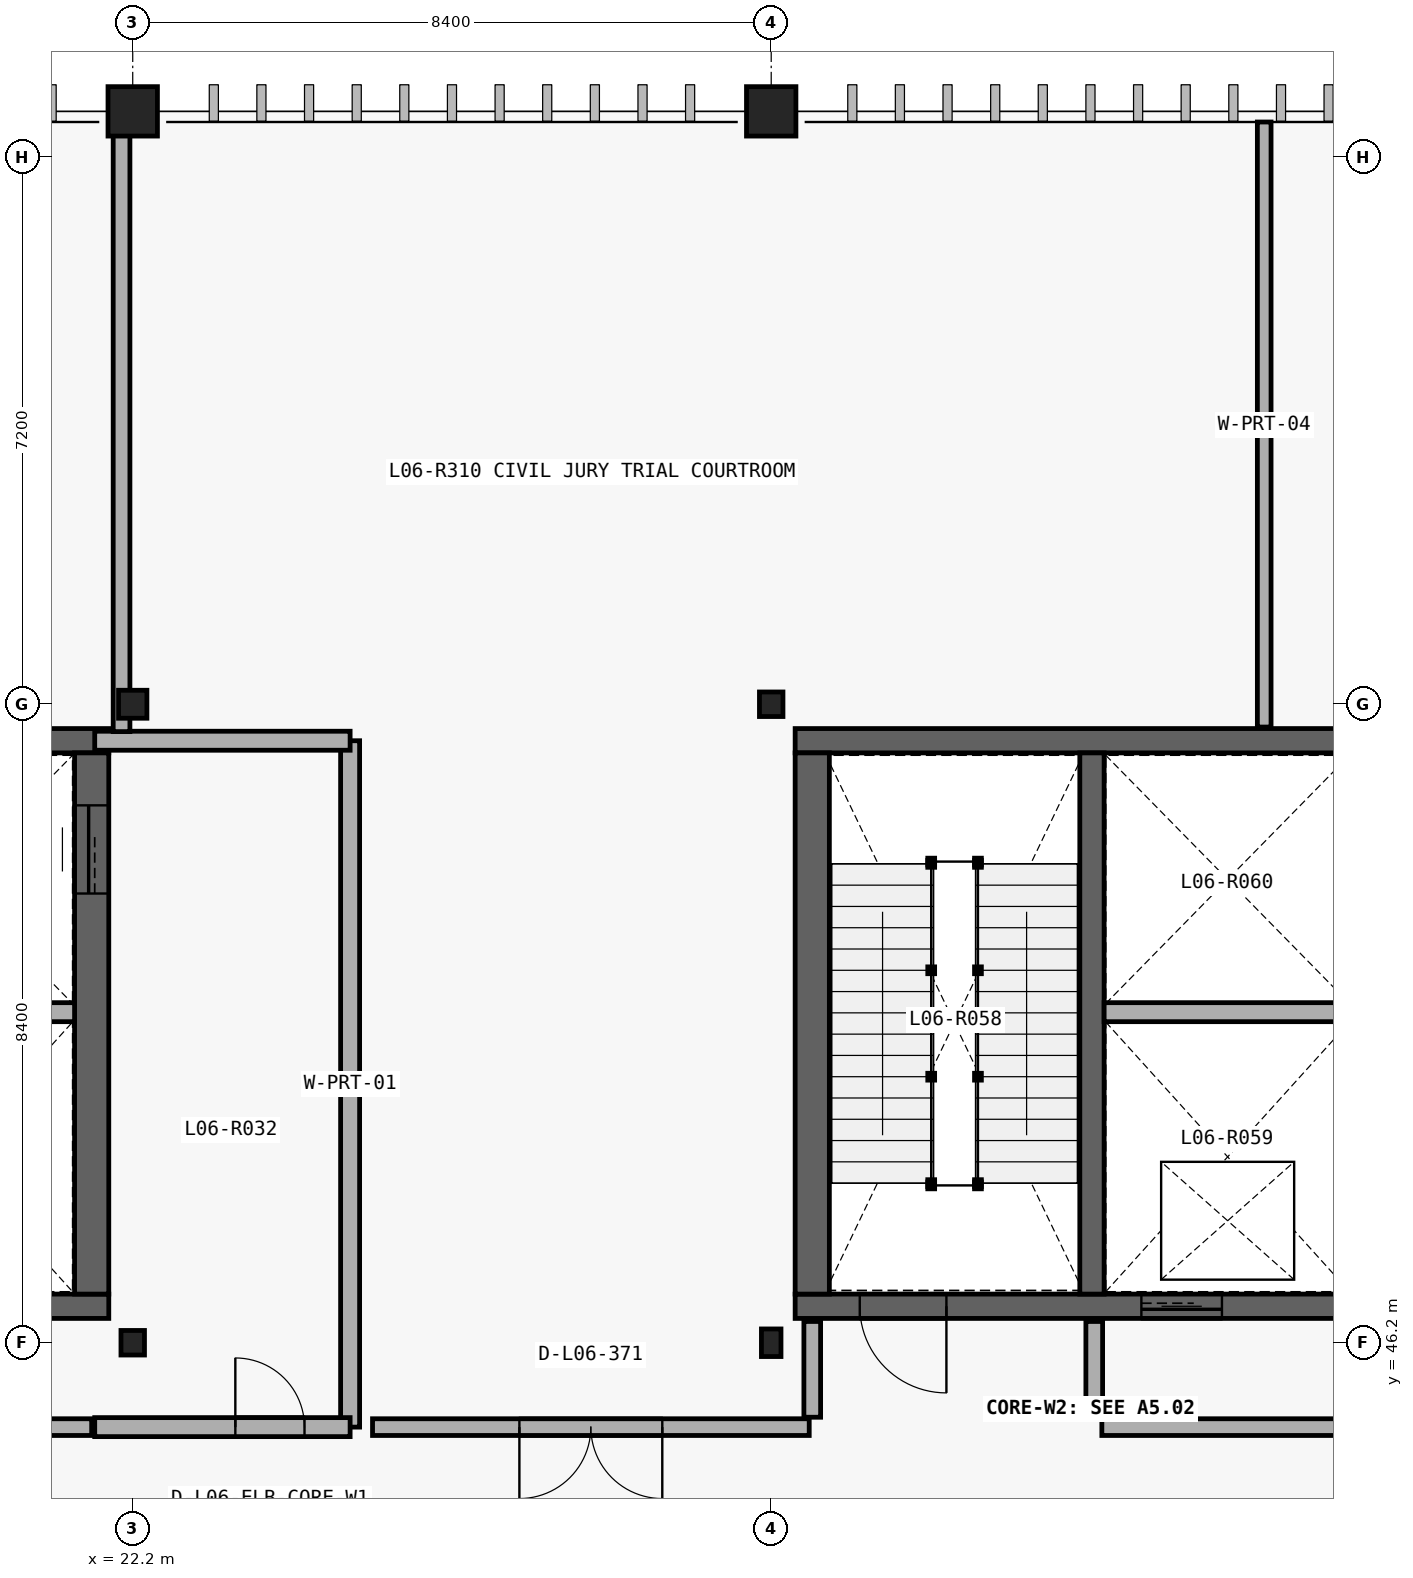
"""IFC4 building model, lengths in metres.
Left out: names, types, materials, properties, quantities, classifications, styles, units other than length and angle.
Written with IfcOpenShell. Run it as: python <this file> out.ifc"""

import sys

from ifc_helpers import new_model, si_unit, direction, frame, frame_2d, origin_with_axes, origin_2d_with_axis, place, context, subcontext, project, spatial, rectangle, circle, i_section, extrude, element, fill, save


model = new_model("IFC4")
c1 = context("Model", 3, precision=1e-05, world=origin_with_axes(), true_north=direction((0.0, 1.0)))
c2 = subcontext(c1, "Body", "Model", "MODEL_VIEW")
j1 = project(units=[si_unit("LENGTHUNIT", "METRE"), si_unit("PLANEANGLEUNIT", "RADIAN")], contexts=[c1])
p1 = place(None, origin_with_axes())
s1 = spatial("IfcSite", under=j1, at=p1, CompositionType="ELEMENT")
p2 = place(p1, origin_with_axes())
s2 = spatial("IfcBuilding", under=s1, at=p2, CompositionType="ELEMENT")
p3 = place(p2, frame((0.0, 0.0, 29.7), z_axis=(0.0, 0.0, 1.0), x_axis=(1.0, 0.0, 0.0)))
s3 = spatial("IfcBuildingStorey", under=s2, at=p3, CompositionType="ELEMENT", Elevation=29.7)
p4 = place(None, frame((14.115, 46.68, 29.7), z_axis=(0.0, 0.0, 1.0), x_axis=(1.0, 0.0, 0.0)))
e1 = element("IfcWall", 1, at=p4, inside=s3, PredefinedType="SHEAR", context=c2, shape_type="SweptSolid", body=[
    extrude(rectangle(XDim=7.77, YDim=0.32, at=frame_2d((3.885, 0.0), x_axis=(1.0, 0.0))), origin_with_axes(), (0.0, 0.0, 1.0), 4.8),
])
p5 = place(None, frame((15.535, 46.68, 29.7), z_axis=(0.0, 0.0, 1.0), x_axis=(1.0, 0.0, 0.0)))
e2 = element("IfcOpeningElement", 2, at=p5, cuts=e1, PredefinedType="OPENING", context=c2, shape_type="SweptSolid", body=[
    extrude(rectangle(XDim=1.14, YDim=2.18, at=frame_2d((0.0, 1.09), x_axis=(1.0, 0.0))), frame((0.0, 0.17, 0.0), z_axis=(0.0, -1.0, 0.0), x_axis=(1.0, 0.0, 0.0)), (0.0, 0.0, 1.0), 0.34),
])
p6 = place(None, frame((19.25, 46.68, 29.7), z_axis=(0.0, 0.0, 1.0), x_axis=(1.0, 0.0, 0.0)))
e3 = element("IfcOpeningElement", 3, at=p6, cuts=e1, PredefinedType="OPENING", context=c2, shape_type="SweptSolid", body=[
    extrude(rectangle(XDim=1.16, YDim=2.2, at=frame_2d((0.0, 1.1), x_axis=(1.0, 0.0))), frame((0.0, 0.17, 0.0), z_axis=(0.0, -1.0, 0.0), x_axis=(1.0, 0.0, 0.0)), (0.0, 0.0, 1.0), 0.34),
])
p7 = place(None, frame((21.885, 54.12, 29.7), z_axis=(0.0, 0.0, 1.0), x_axis=(-1.0, 0.0, 0.0)))
e4 = element("IfcWall", 4, at=p7, inside=s3, PredefinedType="SHEAR", context=c2, shape_type="SweptSolid", body=[
    extrude(rectangle(XDim=7.77, YDim=0.32, at=frame_2d((3.885, 0.0), x_axis=(1.0, 0.0))), origin_with_axes(), (0.0, 0.0, 1.0), 4.8),
])
p8 = place(None, frame((21.66, 46.84, 29.7), z_axis=(0.0, 0.0, 1.0), x_axis=(0.0, 1.0, 0.0)))
e5 = element("IfcWall", 5, at=p8, inside=s3, PredefinedType="SHEAR", context=c2, shape_type="SweptSolid", body=[
    extrude(rectangle(XDim=7.12, YDim=0.45, at=frame_2d((3.56, 0.0), x_axis=(1.0, 0.0))), origin_with_axes(), (0.0, 0.0, 1.0), 4.8),
])
p9 = place(None, frame((21.66, 52.69, 29.7), z_axis=(0.0, 0.0, 1.0), x_axis=(0.0, 1.0, 0.0)))
e6 = element("IfcOpeningElement", 6, at=p9, cuts=e5, PredefinedType="OPENING", context=c2, shape_type="SweptSolid", body=[
    extrude(rectangle(XDim=1.16, YDim=2.2, at=frame_2d((0.0, 1.1), x_axis=(1.0, 0.0))), frame((0.0, 0.235, 0.0), z_axis=(0.0, -1.0, 0.0), x_axis=(1.0, 0.0, 0.0)), (0.0, 0.0, 1.0), 0.47),
])
p10 = place(None, frame((18.18, 50.549, 29.7), z_axis=(0.0, 0.0, 1.0), x_axis=(1.0, 0.0, 0.0)))
e7 = element("IfcWall", 7, at=p10, inside=s3, PredefinedType="PARTITIONING", context=c2, shape_type="SweptSolid", body=[
    extrude(rectangle(XDim=3.255, YDim=0.25, at=frame_2d((1.627, 0.0), x_axis=(1.0, 0.0))), origin_with_axes(), (0.0, 0.0, 1.0), 4.48),
])
p11 = place(None, frame((25.06, 45.09, 29.7), z_axis=(0.0, 0.0, 1.0), x_axis=(0.0, 1.0, 0.0)))
e8 = element("IfcWall", 8, at=p11, inside=s3, PredefinedType="PARTITIONING", context=c2, shape_type="SweptSolid", body=[
    extrude(rectangle(XDim=9.03, YDim=0.25, at=frame_2d((4.515, 0.0), x_axis=(1.0, 0.0))), origin_with_axes(), (0.0, 0.0, 1.0), 4.48),
])
p12 = place(None, frame((21.7, 54.12, 29.7), z_axis=(0.0, 0.0, 1.0), x_axis=(1.0, 0.0, 0.0)))
e9 = element("IfcWall", 9, at=p12, inside=s3, PredefinedType="PARTITIONING", context=c2, shape_type="SweptSolid", body=[
    extrude(rectangle(XDim=3.36, YDim=0.25, at=frame_2d((1.68, 0.0), x_axis=(1.0, 0.0))), origin_with_axes(), (0.0, 0.0, 1.0), 4.48),
])
p13 = place(None, frame((21.7, 45.09, 29.7), z_axis=(0.0, 0.0, 1.0), x_axis=(1.0, 0.0, 0.0)))
e10 = element("IfcWall", 10, at=p13, inside=s3, PredefinedType="PARTITIONING", context=c2, shape_type="SweptSolid", body=[
    extrude(rectangle(XDim=3.36, YDim=0.25, at=frame_2d((1.68, 0.0), x_axis=(1.0, 0.0))), origin_with_axes(), (0.0, 0.0, 1.0), 4.48),
])
p14 = place(None, frame((24.005, 45.09, 29.7), z_axis=(0.0, 0.0, 1.0), x_axis=(1.0, 0.0, 0.0)))
e11 = element("IfcOpeningElement", 11, at=p14, cuts=e10, PredefinedType="OPENING", context=c2, shape_type="SweptSolid", body=[
    extrude(rectangle(XDim=0.91, YDim=2.12, at=frame_2d((0.0, 1.06), x_axis=(1.0, 0.0))), frame((0.0, 0.135, 0.0), z_axis=(0.0, -1.0, 0.0), x_axis=(1.0, 0.0, 0.0)), (0.0, 0.0, 1.0), 0.27),
])
p15 = place(None, frame((30.915, 46.68, 29.7), z_axis=(0.0, 0.0, 1.0), x_axis=(1.0, 0.0, 0.0)))
e12 = element("IfcWall", 12, at=p15, inside=s3, PredefinedType="SHEAR", context=c2, shape_type="SweptSolid", body=[
    extrude(rectangle(XDim=7.77, YDim=0.32, at=frame_2d((3.885, 0.0), x_axis=(1.0, 0.0))), origin_with_axes(), (0.0, 0.0, 1.0), 4.8),
])
p16 = place(None, frame((32.335, 46.68, 29.7), z_axis=(0.0, 0.0, 1.0), x_axis=(1.0, 0.0, 0.0)))
e13 = element("IfcOpeningElement", 13, at=p16, cuts=e12, PredefinedType="OPENING", context=c2, shape_type="SweptSolid", body=[
    extrude(rectangle(XDim=1.14, YDim=2.18, at=frame_2d((0.0, 1.09), x_axis=(1.0, 0.0))), frame((0.0, 0.17, 0.0), z_axis=(0.0, -1.0, 0.0), x_axis=(1.0, 0.0, 0.0)), (0.0, 0.0, 1.0), 0.34),
])
p17 = place(None, frame((36.0, 46.68, 29.7), z_axis=(0.0, 0.0, 1.0), x_axis=(1.0, 0.0, 0.0)))
e14 = element("IfcOpeningElement", 14, at=p17, cuts=e12, PredefinedType="OPENING", context=c2, shape_type="SweptSolid", body=[
    extrude(rectangle(XDim=1.06, YDim=2.16, at=frame_2d((0.0, 1.08), x_axis=(1.0, 0.0))), frame((0.0, 0.17, 0.0), z_axis=(0.0, -1.0, 0.0), x_axis=(1.0, 0.0, 0.0)), (0.0, 0.0, 1.0), 0.34),
])
p18 = place(None, frame((38.685, 54.12, 29.7), z_axis=(0.0, 0.0, 1.0), x_axis=(-1.0, 0.0, 0.0)))
e15 = element("IfcWall", 15, at=p18, inside=s3, PredefinedType="SHEAR", context=c2, shape_type="SweptSolid", body=[
    extrude(rectangle(XDim=7.77, YDim=0.32, at=frame_2d((3.885, 0.0), x_axis=(1.0, 0.0))), origin_with_axes(), (0.0, 0.0, 1.0), 4.8),
])
p19 = place(None, frame((31.14, 53.96, 29.7), z_axis=(0.0, 0.0, 1.0), x_axis=(0.0, -1.0, 0.0)))
e16 = element("IfcWall", 16, at=p19, inside=s3, PredefinedType="SHEAR", context=c2, shape_type="SweptSolid", body=[
    extrude(rectangle(XDim=7.12, YDim=0.45, at=frame_2d((3.56, 0.0), x_axis=(1.0, 0.0))), origin_with_axes(), (0.0, 0.0, 1.0), 4.8),
])
p20 = place(None, frame((34.82, 46.84, 29.7), z_axis=(0.0, 0.0, 1.0), x_axis=(0.0, 1.0, 0.0)))
e17 = element("IfcWall", 17, at=p20, inside=s3, PredefinedType="SHEAR", context=c2, shape_type="SweptSolid", body=[
    extrude(rectangle(XDim=7.12, YDim=0.32, at=frame_2d((3.56, 0.0), x_axis=(1.0, 0.0))), origin_with_axes(), (0.0, 0.0, 1.0), 4.8),
])
p21 = place(None, frame((34.98, 50.549, 29.7), z_axis=(0.0, 0.0, 1.0), x_axis=(1.0, 0.0, 0.0)))
e18 = element("IfcWall", 18, at=p21, inside=s3, PredefinedType="PARTITIONING", context=c2, shape_type="SweptSolid", body=[
    extrude(rectangle(XDim=3.255, YDim=0.25, at=frame_2d((1.627, 0.0), x_axis=(1.0, 0.0))), origin_with_axes(), (0.0, 0.0, 1.0), 4.48),
])
for number, where, z_axis, x_axis in (
    (19, (31.14, 45.22, 29.7), (0.0, 0.0, 1.0), (0.0, 1.0, 0.0)),
    (20, (34.85, 45.22, 29.7), (0.0, 0.0, 1.0), (0.0, 1.0, 0.0)),
):
    element("IfcWall", number, at=place(None, frame(where, z_axis=z_axis, x_axis=x_axis)), inside=s3, PredefinedType="PARTITIONING", context=c2, shape_type="SweptSolid", body=[
        extrude(rectangle(XDim=1.26, YDim=0.22, at=frame_2d((0.63, 0.0), x_axis=(1.0, 0.0))), origin_with_axes(), (0.0, 0.0, 1.0), 4.48),
    ])
p22 = place(None, frame((18.15, 45.09, 29.7), z_axis=(0.0, 0.0, 1.0), x_axis=(1.0, 0.0, 0.0)))
e21 = element("IfcWall", 21, at=p22, inside=s3, PredefinedType="PARTITIONING", context=c2, shape_type="SweptSolid", body=[
    extrude(rectangle(XDim=3.51, YDim=0.22, at=frame_2d((1.755, 0.0), x_axis=(1.0, 0.0))), origin_with_axes(), (0.0, 0.0, 1.0), 4.48),
])
p23 = place(None, frame((25.355, 45.09, 29.7), z_axis=(0.0, 0.0, 1.0), x_axis=(1.0, 0.0, 0.0)))
e22 = element("IfcWall", 22, at=p23, inside=s3, PredefinedType="PARTITIONING", context=c2, shape_type="SweptSolid", body=[
    extrude(rectangle(XDim=5.745, YDim=0.22, at=frame_2d((2.873, 0.0), x_axis=(1.0, 0.0))), origin_with_axes(), (0.0, 0.0, 1.0), 4.48),
])
p24 = place(None, frame((28.227, 45.09, 29.7), z_axis=(0.0, 0.0, 1.0), x_axis=(1.0, 0.0, 0.0)))
e23 = element("IfcOpeningElement", 23, at=p24, cuts=e22, PredefinedType="OPENING", context=c2, shape_type="SweptSolid", body=[
    extrude(rectangle(XDim=1.88, YDim=2.56, at=frame_2d((0.0, 1.28), x_axis=(1.0, 0.0))), frame((0.0, 0.12, 0.0), z_axis=(0.0, -1.0, 0.0), x_axis=(1.0, 0.0, 0.0)), (0.0, 0.0, 1.0), 0.24),
])
p25 = place(None, frame((34.95, 45.09, 29.7), z_axis=(0.0, 0.0, 1.0), x_axis=(1.0, 0.0, 0.0)))
e24 = element("IfcWall", 24, at=p25, inside=s3, PredefinedType="PARTITIONING", context=c2, shape_type="SweptSolid", body=[
    extrude(rectangle(XDim=11.71, YDim=0.22, at=frame_2d((5.855, 0.0), x_axis=(1.0, 0.0))), origin_with_axes(), (0.0, 0.0, 1.0), 4.48),
])
p26 = place(None, frame((41.711, 45.09, 29.7), z_axis=(0.0, 0.0, 1.0), x_axis=(1.0, 0.0, 0.0)))
e25 = element("IfcOpeningElement", 25, at=p26, cuts=e24, PredefinedType="OPENING", context=c2, shape_type="SweptSolid", body=[
    extrude(rectangle(XDim=1.6, YDim=2.32, at=frame_2d((0.0, 1.16), x_axis=(1.0, 0.0))), frame((0.0, 0.12, 0.0), z_axis=(0.0, -1.0, 0.0), x_axis=(1.0, 0.0, 0.0)), (0.0, 0.0, 1.0), 0.24),
])
p27 = place(None, frame((22.053, 54.24, 29.7), z_axis=(0.0, 0.0, 1.0), x_axis=(0.0, 1.0, 0.0)))
e26 = element("IfcWall", 26, at=p27, inside=s3, PredefinedType="PARTITIONING", context=c2, shape_type="SweptSolid", body=[
    extrude(rectangle(XDim=8.02, YDim=0.22, at=frame_2d((4.01, 0.0), x_axis=(1.0, 0.0))), origin_with_axes(), (0.0, 0.0, 1.0), 3.858),
])
p28 = place(None, frame((37.086, 54.3, 29.7), z_axis=(0.0, 0.0, 1.0), x_axis=(0.0, 1.0, 0.0)))
e27 = element("IfcWall", 27, at=p28, inside=s3, PredefinedType="PARTITIONING", context=c2, shape_type="SweptSolid", body=[
    extrude(rectangle(XDim=7.96, YDim=0.18, at=frame_2d((3.98, 0.0), x_axis=(1.0, 0.0))), origin_with_axes(), (0.0, 0.0, 1.0), 4.48),
])
p29 = place(None, frame((22.2, 46.2, 29.7), z_axis=(0.0, 0.0, 1.0), x_axis=(1.0, 0.0, 0.0)))
e28 = element("IfcColumn", 28, at=p29, inside=s3, PredefinedType="COLUMN", context=c2, shape_type="SweptSolid", body=[
    extrude(i_section(OverallWidth=0.309, OverallDepth=0.323, WebThickness=0.014, FlangeThickness=0.023, at=origin_2d_with_axis()), origin_with_axes(), (0.0, 0.0, 1.0), 4.8),
])
p30 = place(None, frame((22.2, 54.6, 29.7), z_axis=(0.0, 0.0, 1.0), x_axis=(1.0, 0.0, 0.0)))
e29 = element("IfcColumn", 29, at=p30, inside=s3, PredefinedType="COLUMN", context=c2, shape_type="SweptSolid", body=[
    extrude(i_section(OverallWidth=0.373, OverallDepth=0.368, WebThickness=0.015, FlangeThickness=0.024, at=origin_2d_with_axis()), origin_with_axes(), (0.0, 0.0, 1.0), 4.8),
])
p31 = place(None, frame((22.2, 62.4, 29.7), z_axis=(0.0, 0.0, 1.0), x_axis=(1.0, 0.0, 0.0)))
e30 = element("IfcColumn", 30, at=p31, inside=s3, PredefinedType="COLUMN", context=c2, shape_type="SweptSolid", body=[
    extrude(circle(Radius=0.325, at=origin_2d_with_axis()), origin_with_axes(), (0.0, 0.0, 1.0), 4.8),
])
p32 = place(None, frame((30.6, 46.2, 29.7), z_axis=(0.0, 0.0, 1.0), x_axis=(1.0, 0.0, 0.0)))
e31 = element("IfcColumn", 31, at=p32, inside=s3, PredefinedType="COLUMN", context=c2, shape_type="SweptSolid", body=[
    extrude(i_section(OverallWidth=0.257, OverallDepth=0.363, WebThickness=0.013, FlangeThickness=0.022, at=origin_2d_with_axis()), origin_with_axes(), (0.0, 0.0, 1.0), 4.8),
])
p33 = place(None, frame((30.6, 54.6, 29.7), z_axis=(0.0, 0.0, 1.0), x_axis=(1.0, 0.0, 0.0)))
e32 = element("IfcColumn", 32, at=p33, inside=s3, PredefinedType="COLUMN", context=c2, shape_type="SweptSolid", body=[
    extrude(i_section(OverallWidth=0.309, OverallDepth=0.323, WebThickness=0.014, FlangeThickness=0.023, at=origin_2d_with_axis()), origin_with_axes(), (0.0, 0.0, 1.0), 4.8),
])
p34 = place(None, frame((30.6, 62.4, 29.7), z_axis=(0.0, 0.0, 1.0), x_axis=(1.0, 0.0, 0.0)))
e33 = element("IfcColumn", 33, at=p34, inside=s3, PredefinedType="COLUMN", context=c2, shape_type="SweptSolid", body=[
    extrude(circle(Radius=0.325, at=origin_2d_with_axis()), origin_with_axes(), (0.0, 0.0, 1.0), 4.8),
])
p35 = place(None, frame((21.66, 52.69, 29.7), z_axis=(0.0, 0.0, 1.0), x_axis=(0.0, 1.0, 0.0)))
e34 = element("IfcDoor", 34, at=p35, inside=s3, OperationType="SLIDING_TO_LEFT", PredefinedType="DOOR", context=c2, shape_type="SweptSolid", body=[
    extrude(rectangle(XDim=1.16, YDim=2.2, at=frame_2d((0.0, 1.1), x_axis=(1.0, 0.0))), frame((0.0, 0.04, 0.0), z_axis=(0.0, -1.0, 0.0), x_axis=(1.0, 0.0, 0.0)), (0.0, 0.0, 1.0), 0.08),
])
fill(e6, e34)
p36 = place(None, frame((24.005, 45.09, 29.7), z_axis=(0.0, 0.0, 1.0), x_axis=(1.0, 0.0, 0.0)))
e35 = element("IfcDoor", 35, at=p36, inside=s3, OperationType="SINGLE_SWING_LEFT", PredefinedType="DOOR", context=c2, shape_type="SweptSolid", body=[
    extrude(rectangle(XDim=0.91, YDim=2.12, at=frame_2d((0.0, 1.06), x_axis=(1.0, 0.0))), frame((0.0, 0.04, 0.0), z_axis=(0.0, -1.0, 0.0), x_axis=(1.0, 0.0, 0.0)), (0.0, 0.0, 1.0), 0.08),
])
fill(e11, e35)
p37 = place(None, frame((32.335, 46.68, 29.7), z_axis=(0.0, 0.0, 1.0), x_axis=(-1.0, 0.0, 0.0)))
e36 = element("IfcDoor", 36, at=p37, inside=s3, OperationType="SINGLE_SWING_RIGHT", PredefinedType="DOOR", context=c2, shape_type="SweptSolid", body=[
    extrude(rectangle(XDim=1.14, YDim=2.18, at=frame_2d((0.0, 1.09), x_axis=(1.0, 0.0))), frame((0.0, 0.04, 0.0), z_axis=(0.0, -1.0, 0.0), x_axis=(1.0, 0.0, 0.0)), (0.0, 0.0, 1.0), 0.08),
])
fill(e13, e36)
p38 = place(None, frame((36.0, 46.68, 29.7), z_axis=(0.0, 0.0, 1.0), x_axis=(-1.0, 0.0, 0.0)))
e37 = element("IfcDoor", 37, at=p38, inside=s3, OperationType="SLIDING_TO_LEFT", PredefinedType="DOOR", context=c2, shape_type="SweptSolid", body=[
    extrude(rectangle(XDim=1.06, YDim=2.16, at=frame_2d((0.0, 1.08), x_axis=(1.0, 0.0))), frame((0.0, 0.04, 0.0), z_axis=(0.0, -1.0, 0.0), x_axis=(1.0, 0.0, 0.0)), (0.0, 0.0, 1.0), 0.08),
])
fill(e14, e37)
p39 = place(None, frame((28.227, 45.09, 29.7), z_axis=(0.0, 0.0, 1.0), x_axis=(-1.0, 0.0, 0.0)))
e38 = element("IfcDoor", 38, at=p39, inside=s3, OperationType="DOUBLE_DOOR_SINGLE_SWING", PredefinedType="DOOR", context=c2, shape_type="SweptSolid", body=[
    extrude(rectangle(XDim=1.88, YDim=2.56, at=frame_2d((0.0, 1.28), x_axis=(1.0, 0.0))), frame((0.0, 0.04, 0.0), z_axis=(0.0, -1.0, 0.0), x_axis=(1.0, 0.0, 0.0)), (0.0, 0.0, 1.0), 0.08),
])
fill(e23, e38)
save(model, sys.argv[1])
